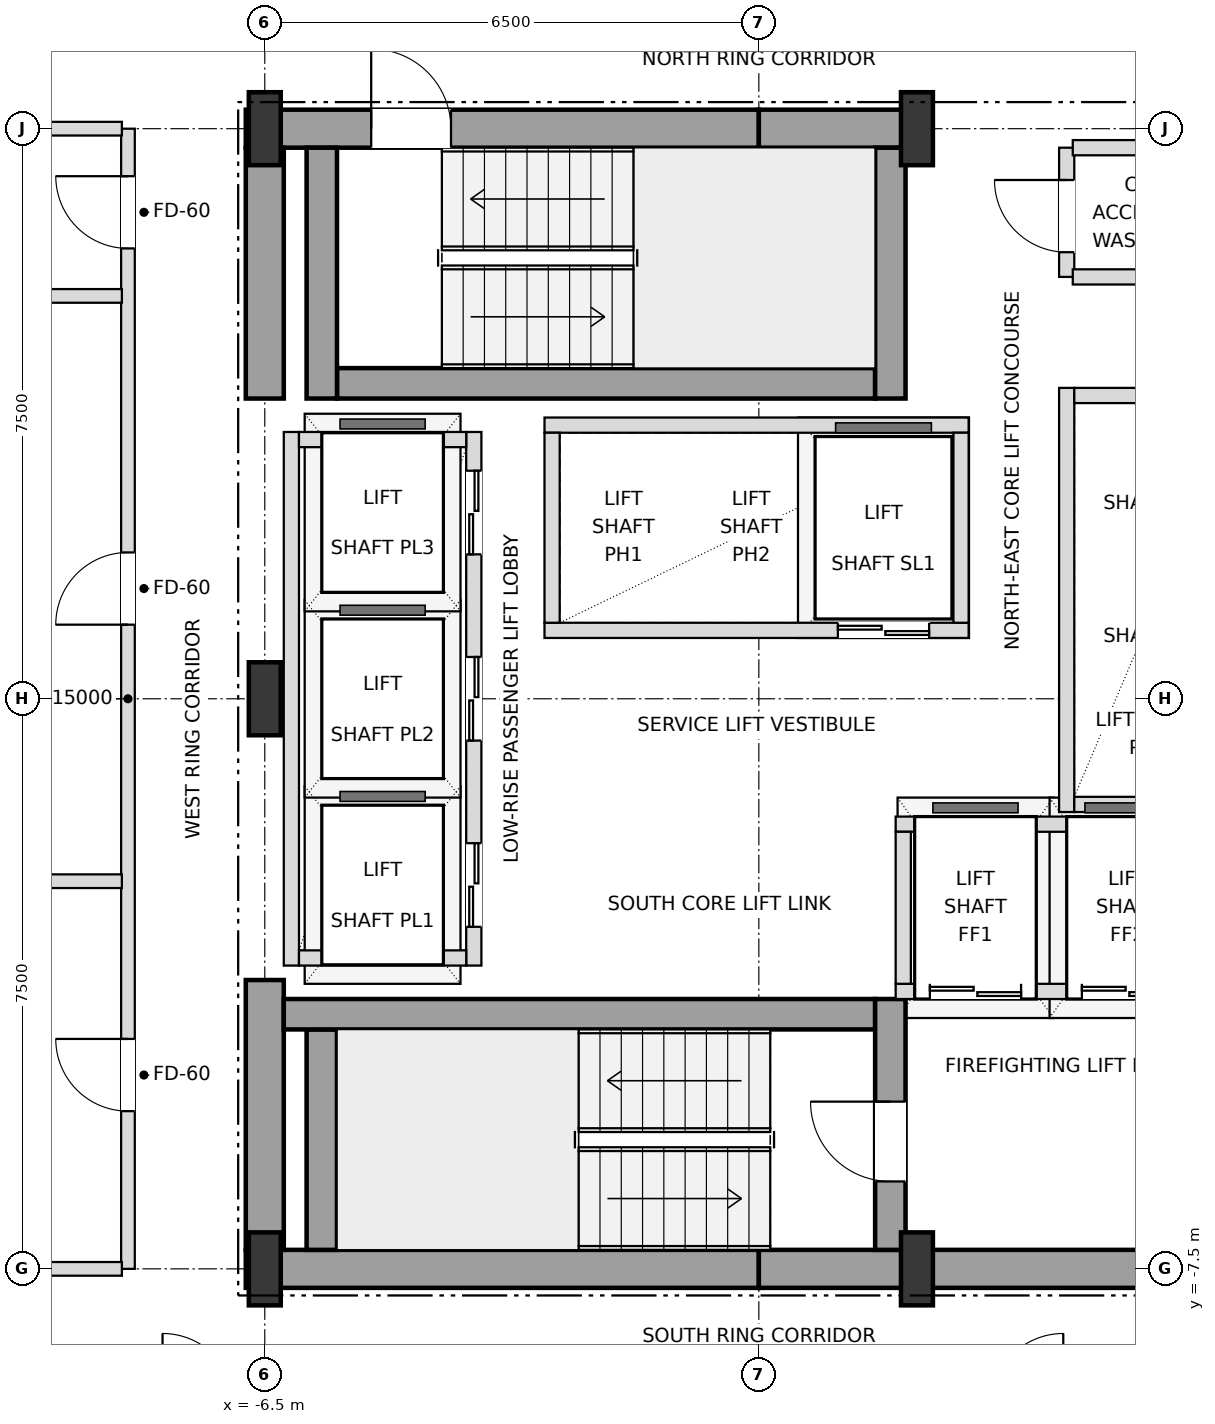
"""IFC4 building model, lengths in metres.
Left out: names, types, materials, properties, quantities, classifications, styles, units other than length and angle.
Written with IfcOpenShell. Run it as: python <this file> out.ifc"""

import sys

from ifc_helpers import new_model, si_unit, direction, frame, frame_2d, origin, origin_2d, place, context, subcontext, project, spatial, rectangle, i_section, extrude, element, fill, save


model = new_model("IFC4")
c1 = context("Model", 3, precision=1e-05, world=origin(), true_north=direction((0.0, 1.0)))
c2 = subcontext(c1, "Body", "Model", "MODEL_VIEW")
j1 = project(units=[si_unit("LENGTHUNIT", "METRE"), si_unit("PLANEANGLEUNIT", "RADIAN")], contexts=[c1])
p1 = place(None, origin())
s1 = spatial("IfcSite", under=j1, at=p1, CompositionType="ELEMENT")
p2 = place(p1, origin())
s2 = spatial("IfcBuilding", under=s1, at=p2, CompositionType="ELEMENT")
p3 = place(p2, frame((0.0, 0.0, 86.4)))
s3 = spatial("IfcBuildingStorey", under=s2, at=p3, CompositionType="ELEMENT", Elevation=86.4)
for number, where, z_axis, x_axis in (
    (1, (-6.5, -7.5, 0.0), (0.0, 0.0, 1.0), (1.0, 0.0, 0.0)),
    (2, (2.08, -7.5, 0.0), (0.0, 0.0, 1.0), (1.0, 0.0, 0.0)),
    (3, (-6.5, 0.0, 0.0), (0.0, 0.0, 1.0), (1.0, 0.0, 0.0)),
    (4, (-6.5, 7.5, 0.0), (0.0, 0.0, 1.0), (1.0, 0.0, 0.0)),
    (5, (2.08, 7.5, 0.0), (0.0, 0.0, 1.0), (1.0, 0.0, 0.0)),
):
    element("IfcColumn", number, at=place(p3, frame(where, z_axis=z_axis, x_axis=x_axis)), inside=s3, PredefinedType="COLUMN", context=c2, shape_type="SweptSolid", body=[
        extrude(i_section(OverallWidth=0.42, OverallDepth=0.96, WebThickness=0.022, FlangeThickness=0.034, at=origin_2d()), origin(), (0.0, 0.0, 1.0), 3.6),
    ])
for number, where, z_axis, x_axis in (
    (6, (-6.75, -7.5, 0.0), (0.0, 0.0, 1.0), (1.0, 0.0, 0.0)),
    (7, (0.0, -7.5, 0.0), (0.0, 0.0, 1.0), (1.0, 0.0, 0.0)),
):
    element("IfcWall", number, at=place(p3, frame(where, z_axis=z_axis, x_axis=x_axis)), inside=s3, PredefinedType="SHEAR", context=c2, shape_type="SweptSolid", body=[
        extrude(rectangle(XDim=6.75, YDim=0.5, at=frame_2d((3.375, 0.0))), origin(), (0.0, 0.0, 1.0), 3.38),
    ])
p4 = place(p3, frame((-6.75, 7.5, 0.0), z_axis=(0.0, 0.0, 1.0), x_axis=(1.0, 0.0, 0.0)))
e8 = element("IfcWall", 8, at=p4, inside=s3, PredefinedType="SHEAR", context=c2, shape_type="SweptSolid", body=[
    extrude(rectangle(XDim=6.75, YDim=0.5, at=frame_2d((3.375, 0.0))), origin(), (0.0, 0.0, 1.0), 3.38),
])
p5 = place(p4, frame((1.65, 0.0, 0.0)))
e9 = element("IfcOpeningElement", 9, at=p5, cuts=e8, PredefinedType="OPENING", context=c2, shape_type="SweptSolid", body=[
    extrude(rectangle(XDim=1.05, YDim=2.15, at=frame_2d((0.525, 1.075))), frame((0.0, 0.26, 0.0), z_axis=(0.0, -1.0, 0.0), x_axis=(1.0, 0.0, 0.0)), (0.0, 0.0, 1.0), 0.52),
])
p6 = place(p3, frame((0.0, 7.5, 0.0), z_axis=(0.0, 0.0, 1.0), x_axis=(1.0, 0.0, 0.0)))
e10 = element("IfcWall", 10, at=p6, inside=s3, PredefinedType="SHEAR", context=c2, shape_type="SweptSolid", body=[
    extrude(rectangle(XDim=2.08, YDim=0.5, at=frame_2d((1.04, 0.0))), origin(), (0.0, 0.0, 1.0), 3.38),
])
p7 = place(p3, frame((-6.5, -7.25, 0.0), z_axis=(0.0, 0.0, 1.0), x_axis=(0.0, 1.0, 0.0)))
e11 = element("IfcWall", 11, at=p7, inside=s3, PredefinedType="SHEAR", context=c2, shape_type="SweptSolid", body=[
    extrude(rectangle(XDim=3.55, YDim=0.5, at=frame_2d((1.775, 0.0))), origin(), (0.0, 0.0, 1.0), 3.38),
])
p8 = place(p3, frame((-6.5, 3.95, 0.0), z_axis=(0.0, 0.0, 1.0), x_axis=(0.0, 1.0, 0.0)))
e12 = element("IfcWall", 12, at=p8, inside=s3, PredefinedType="SHEAR", context=c2, shape_type="SweptSolid", body=[
    extrude(rectangle(XDim=3.3, YDim=0.5, at=frame_2d((1.65, 0.0))), origin(), (0.0, 0.0, 1.0), 3.38),
])
p9 = place(p3, frame((-5.75, -7.25, 0.0), z_axis=(0.0, 0.0, 1.0), x_axis=(0.0, 1.0, 0.0)))
e13 = element("IfcWall", 13, at=p9, inside=s3, PredefinedType="SHEAR", context=c2, shape_type="SweptSolid", body=[
    extrude(rectangle(XDim=2.9, YDim=0.4, at=frame_2d((1.45, 0.0))), origin(), (0.0, 0.0, 1.0), 3.38),
])
p10 = place(p3, frame((-6.25, -4.15, 0.0), z_axis=(0.0, 0.0, 1.0), x_axis=(1.0, 0.0, 0.0)))
e14 = element("IfcWall", 14, at=p10, inside=s3, PredefinedType="SHEAR", context=c2, shape_type="SweptSolid", body=[
    extrude(rectangle(XDim=7.78, YDim=0.4, at=frame_2d((3.89, 0.0))), origin(), (0.0, 0.0, 1.0), 3.38),
])
p11 = place(p3, frame((1.73, -7.25, 0.0), z_axis=(0.0, 0.0, 1.0), x_axis=(0.0, 1.0, 0.0)))
e15 = element("IfcWall", 15, at=p11, inside=s3, PredefinedType="SHEAR", context=c2, shape_type="SweptSolid", body=[
    extrude(rectangle(XDim=3.3, YDim=0.4, at=frame_2d((1.65, 0.0))), origin(), (0.0, 0.0, 1.0), 3.38),
])
p12 = place(p11, frame((0.9, 0.0, 0.0)))
e16 = element("IfcOpeningElement", 16, at=p12, cuts=e15, PredefinedType="OPENING", context=c2, shape_type="SweptSolid", body=[
    extrude(rectangle(XDim=1.05, YDim=2.15, at=frame_2d((0.525, 1.075))), frame((0.0, 0.21, 0.0), z_axis=(0.0, -1.0, 0.0), x_axis=(1.0, 0.0, 0.0)), (0.0, 0.0, 1.0), 0.42),
])
p13 = place(p3, frame((-5.55, 4.15, 0.0), z_axis=(0.0, 0.0, 1.0), x_axis=(1.0, 0.0, 0.0)))
e17 = element("IfcWall", 17, at=p13, inside=s3, PredefinedType="SHEAR", context=c2, shape_type="SweptSolid", body=[
    extrude(rectangle(XDim=7.08, YDim=0.4, at=frame_2d((3.54, 0.0))), origin(), (0.0, 0.0, 1.0), 3.38),
])
for number, where, z_axis, x_axis in (
    (18, (1.73, 3.95, 0.0), (0.0, 0.0, 1.0), (0.0, 1.0, 0.0)),
    (19, (-5.75, 3.95, 0.0), (0.0, 0.0, 1.0), (0.0, 1.0, 0.0)),
):
    element("IfcWall", number, at=place(p3, frame(where, z_axis=z_axis, x_axis=x_axis)), inside=s3, PredefinedType="SHEAR", context=c2, shape_type="SweptSolid", body=[
        extrude(rectangle(XDim=3.3, YDim=0.4, at=frame_2d((1.65, 0.0))), origin(), (0.0, 0.0, 1.0), 3.38),
    ])
p14 = place(p3, frame((-3.75, -3.51, 0.0), z_axis=(0.0, 0.0, 1.0), x_axis=(0.0, 1.0, 0.0)))
e20 = element("IfcWall", 20, at=p14, inside=s3, PredefinedType="SOLIDWALL", context=c2, shape_type="SweptSolid", body=[
    extrude(rectangle(XDim=7.02, YDim=0.2, at=frame_2d((3.51, 0.0))), origin(), (0.0, 0.0, 1.0), 3.38),
])
p15 = place(p14, frame((0.51, 0.0, 0.0)))
e21 = element("IfcOpeningElement", 21, at=p15, cuts=e20, PredefinedType="OPENING", context=c2, shape_type="SweptSolid", body=[
    extrude(rectangle(XDim=1.1, YDim=2.15, at=frame_2d((0.55, 1.075))), frame((0.0, 0.11, 0.0), z_axis=(0.0, -1.0, 0.0), x_axis=(1.0, 0.0, 0.0)), (0.0, 0.0, 1.0), 0.22),
])
p16 = place(p14, frame((2.96, 0.0, 0.0)))
e22 = element("IfcOpeningElement", 22, at=p16, cuts=e20, PredefinedType="OPENING", context=c2, shape_type="SweptSolid", body=[
    extrude(rectangle(XDim=1.1, YDim=2.15, at=frame_2d((0.55, 1.075))), frame((0.0, 0.11, 0.0), z_axis=(0.0, -1.0, 0.0), x_axis=(1.0, 0.0, 0.0)), (0.0, 0.0, 1.0), 0.22),
])
p17 = place(p14, frame((5.41, 0.0, 0.0)))
e23 = element("IfcOpeningElement", 23, at=p17, cuts=e20, PredefinedType="OPENING", context=c2, shape_type="SweptSolid", body=[
    extrude(rectangle(XDim=1.1, YDim=2.15, at=frame_2d((0.55, 1.075))), frame((0.0, 0.11, 0.0), z_axis=(0.0, -1.0, 0.0), x_axis=(1.0, 0.0, 0.0)), (0.0, 0.0, 1.0), 0.22),
])
p18 = place(p3, frame((-6.15, -3.51, 0.0), z_axis=(0.0, 0.0, 1.0), x_axis=(0.0, 1.0, 0.0)))
e24 = element("IfcWall", 24, at=p18, inside=s3, PredefinedType="SOLIDWALL", context=c2, shape_type="SweptSolid", body=[
    extrude(rectangle(XDim=7.02, YDim=0.2, at=frame_2d((3.51, 0.0))), origin(), (0.0, 0.0, 1.0), 3.38),
])
for number, where, z_axis, x_axis in (
    (25, (-6.05, -3.41, 0.0), (0.0, 0.0, 1.0), (1.0, 0.0, 0.0)),
    (26, (-6.05, 3.41, 0.0), (0.0, 0.0, 1.0), (1.0, 0.0, 0.0)),
):
    element("IfcWall", number, at=place(p3, frame(where, z_axis=z_axis, x_axis=x_axis)), inside=s3, PredefinedType="SOLIDWALL", context=c2, shape_type="SweptSolid", body=[
        extrude(rectangle(XDim=2.2, YDim=0.2, at=frame_2d((1.1, 0.0))), origin(), (0.0, 0.0, 1.0), 3.38),
    ])
p19 = place(p3, frame((4.05, -1.49, 0.0), z_axis=(0.0, 0.0, 1.0), x_axis=(0.0, 1.0, 0.0)))
e27 = element("IfcWall", 27, at=p19, inside=s3, PredefinedType="SOLIDWALL", context=c2, shape_type="SweptSolid", body=[
    extrude(rectangle(XDim=5.58, YDim=0.2, at=frame_2d((2.79, 0.0))), origin(), (0.0, 0.0, 1.0), 3.38),
])
for number, where, z_axis, x_axis in (
    (28, (4.15, -1.39, 0.0), (0.0, 0.0, 1.0), (1.0, 0.0, 0.0)),
    (29, (4.15, 3.99, 0.0), (0.0, 0.0, 1.0), (1.0, 0.0, 0.0)),
):
    element("IfcWall", number, at=place(p3, frame(where, z_axis=z_axis, x_axis=x_axis)), inside=s3, PredefinedType="SOLIDWALL", context=c2, shape_type="SweptSolid", body=[
        extrude(rectangle(XDim=2.2, YDim=0.2, at=frame_2d((1.1, 0.0))), origin(), (0.0, 0.0, 1.0), 3.38),
    ])
p20 = place(p3, frame((-2.82, 0.9, 0.0), z_axis=(0.0, 0.0, 1.0), x_axis=(1.0, 0.0, 0.0)))
e30 = element("IfcWall", 30, at=p20, inside=s3, PredefinedType="SOLIDWALL", context=c2, shape_type="SweptSolid", body=[
    extrude(rectangle(XDim=5.58, YDim=0.2, at=frame_2d((2.79, 0.0))), origin(), (0.0, 0.0, 1.0), 3.38),
])
p21 = place(p20, frame((3.86, 0.0, 0.0)))
e31 = element("IfcOpeningElement", 31, at=p21, cuts=e30, PredefinedType="OPENING", context=c2, shape_type="SweptSolid", body=[
    extrude(rectangle(XDim=1.2, YDim=2.2, at=frame_2d((0.6, 1.1))), frame((0.0, 0.11, 0.0), z_axis=(0.0, -1.0, 0.0), x_axis=(1.0, 0.0, 0.0)), (0.0, 0.0, 1.0), 0.22),
])
p22 = place(p3, frame((-2.82, 3.6, 0.0), z_axis=(0.0, 0.0, 1.0), x_axis=(1.0, 0.0, 0.0)))
e32 = element("IfcWall", 32, at=p22, inside=s3, PredefinedType="SOLIDWALL", context=c2, shape_type="SweptSolid", body=[
    extrude(rectangle(XDim=5.58, YDim=0.2, at=frame_2d((2.79, 0.0))), origin(), (0.0, 0.0, 1.0), 3.38),
])
for number, where, z_axis, x_axis in (
    (33, (-2.72, 1.0, 0.0), (0.0, 0.0, 1.0), (0.0, 1.0, 0.0)),
    (34, (2.66, 1.0, 0.0), (0.0, 0.0, 1.0), (0.0, 1.0, 0.0)),
):
    element("IfcWall", number, at=place(p3, frame(where, z_axis=z_axis, x_axis=x_axis)), inside=s3, PredefinedType="SOLIDWALL", context=c2, shape_type="SweptSolid", body=[
        extrude(rectangle(XDim=2.5, YDim=0.2, at=frame_2d((1.25, 0.0))), origin(), (0.0, 0.0, 1.0), 3.38),
    ])
p23 = place(p3, frame((1.8, -3.85, 0.0), z_axis=(0.0, 0.0, 1.0), x_axis=(1.0, 0.0, 0.0)))
e35 = element("IfcWall", 35, at=p23, inside=s3, PredefinedType="SOLIDWALL", context=c2, shape_type="SweptSolid", body=[
    extrude(rectangle(XDim=4.1, YDim=0.2, at=frame_2d((2.05, 0.0))), origin(), (0.0, 0.0, 1.0), 3.38),
])
p24 = place(p23, frame((0.45, 0.0, 0.0)))
e36 = element("IfcOpeningElement", 36, at=p24, cuts=e35, PredefinedType="OPENING", context=c2, shape_type="SweptSolid", body=[
    extrude(rectangle(XDim=1.2, YDim=2.2, at=frame_2d((0.6, 1.1))), frame((0.0, 0.11, 0.0), z_axis=(0.0, -1.0, 0.0), x_axis=(1.0, 0.0, 0.0)), (0.0, 0.0, 1.0), 0.22),
])
p25 = place(p23, frame((2.45, 0.0, 0.0)))
e37 = element("IfcOpeningElement", 37, at=p25, cuts=e35, PredefinedType="OPENING", context=c2, shape_type="SweptSolid", body=[
    extrude(rectangle(XDim=1.2, YDim=2.2, at=frame_2d((0.6, 1.1))), frame((0.0, 0.11, 0.0), z_axis=(0.0, -1.0, 0.0), x_axis=(1.0, 0.0, 0.0)), (0.0, 0.0, 1.0), 0.22),
])
p26 = place(p3, frame((1.8, -1.65, 0.0), z_axis=(0.0, 0.0, 1.0), x_axis=(1.0, 0.0, 0.0)))
e38 = element("IfcWall", 38, at=p26, inside=s3, PredefinedType="SOLIDWALL", context=c2, shape_type="SweptSolid", body=[
    extrude(rectangle(XDim=4.1, YDim=0.2, at=frame_2d((2.05, 0.0))), origin(), (0.0, 0.0, 1.0), 3.38),
])
p27 = place(p3, frame((1.9, -3.75, 0.0), z_axis=(0.0, 0.0, 1.0), x_axis=(0.0, 1.0, 0.0)))
e39 = element("IfcWall", 39, at=p27, inside=s3, PredefinedType="SOLIDWALL", context=c2, shape_type="SweptSolid", body=[
    extrude(rectangle(XDim=2.0, YDim=0.2, at=frame_2d((1.0, 0.0))), origin(), (0.0, 0.0, 1.0), 3.38),
])
p28 = place(p3, frame((-8.3, -7.5, 0.0), z_axis=(0.0, 0.0, 1.0), x_axis=(0.0, 1.0, 0.0)))
e40 = element("IfcWall", 40, at=p28, inside=s3, PredefinedType="PARTITIONING", context=c2, shape_type="SweptSolid", body=[
    extrude(rectangle(XDim=15.0, YDim=0.18, at=frame_2d((7.5, 0.0))), origin(), (0.0, 0.0, 1.0), 3.38),
])
p29 = place(p28, frame((2.075, 0.0, 0.0)))
e41 = element("IfcOpeningElement", 41, at=p29, cuts=e40, PredefinedType="OPENING", context=c2, shape_type="SweptSolid", body=[
    extrude(rectangle(XDim=0.95, YDim=2.15, at=frame_2d((0.475, 1.075))), frame((0.0, 0.1, 0.0), z_axis=(0.0, -1.0, 0.0), x_axis=(1.0, 0.0, 0.0)), (0.0, 0.0, 1.0), 0.2),
])
p30 = place(p28, frame((8.475, 0.0, 0.0)))
e42 = element("IfcOpeningElement", 42, at=p30, cuts=e40, PredefinedType="OPENING", context=c2, shape_type="SweptSolid", body=[
    extrude(rectangle(XDim=0.95, YDim=2.15, at=frame_2d((0.475, 1.075))), frame((0.0, 0.1, 0.0), z_axis=(0.0, -1.0, 0.0), x_axis=(1.0, 0.0, 0.0)), (0.0, 0.0, 1.0), 0.2),
])
p31 = place(p28, frame((13.425, 0.0, 0.0)))
e43 = element("IfcOpeningElement", 43, at=p31, cuts=e40, PredefinedType="OPENING", context=c2, shape_type="SweptSolid", body=[
    extrude(rectangle(XDim=0.95, YDim=2.15, at=frame_2d((0.475, 1.075))), frame((0.0, 0.1, 0.0), z_axis=(0.0, -1.0, 0.0), x_axis=(1.0, 0.0, 0.0)), (0.0, 0.0, 1.0), 0.2),
])
p32 = place(p3, frame((4.05, 5.55, 0.0), z_axis=(0.0, 0.0, 1.0), x_axis=(0.0, 1.0, 0.0)))
e44 = element("IfcWall", 44, at=p32, inside=s3, PredefinedType="SOLIDWALL", context=c2, shape_type="SweptSolid", body=[
    extrude(rectangle(XDim=1.7, YDim=0.2, at=frame_2d((0.85, 0.0))), origin(), (0.0, 0.0, 1.0), 3.38),
])
p33 = place(p32, frame((0.325, 0.0, 0.0)))
e45 = element("IfcOpeningElement", 45, at=p33, cuts=e44, PredefinedType="OPENING", context=c2, shape_type="SweptSolid", body=[
    extrude(rectangle(XDim=0.95, YDim=2.15, at=frame_2d((0.475, 1.075))), frame((0.0, 0.11, 0.0), z_axis=(0.0, -1.0, 0.0), x_axis=(1.0, 0.0, 0.0)), (0.0, 0.0, 1.0), 0.22),
])
p34 = place(p3, frame((-21.9, -7.5, 0.0), z_axis=(0.0, 0.0, 1.0), x_axis=(1.0, 0.0, 0.0)))
e46 = element("IfcWall", 46, at=p34, inside=s3, PredefinedType="PARTITIONING", context=c2, shape_type="SweptSolid", body=[
    extrude(rectangle(XDim=13.52, YDim=0.18, at=frame_2d((6.76, 0.0))), origin(), (0.0, 0.0, 1.0), 2.816),
])
for number, where, z_axis, x_axis in (
    (47, (-21.82, -2.4, 0.0), (0.0, 0.0, 1.0), (1.0, 0.0, 0.0)),
    (48, (-21.82, 5.3, 0.0), (0.0, 0.0, 1.0), (1.0, 0.0, 0.0)),
):
    element("IfcWall", number, at=place(p3, frame(where, z_axis=z_axis, x_axis=x_axis)), inside=s3, PredefinedType="PARTITIONING", context=c2, shape_type="SweptSolid", body=[
        extrude(rectangle(XDim=13.44, YDim=0.18, at=frame_2d((6.72, 0.0))), origin(), (0.0, 0.0, 1.0), 2.816),
    ])
for number, where, z_axis, x_axis in (
    (49, (4.13, 5.55, 0.0), (0.0, 0.0, 1.0), (1.0, 0.0, 0.0)),
    (50, (4.13, 7.25, 0.0), (0.0, 0.0, 1.0), (1.0, 0.0, 0.0)),
):
    element("IfcWall", number, at=place(p3, frame(where, z_axis=z_axis, x_axis=x_axis)), inside=s3, PredefinedType="SOLIDWALL", context=c2, shape_type="SweptSolid", body=[
        extrude(rectangle(XDim=2.07, YDim=0.2, at=frame_2d((1.035, 0.0))), origin(), (0.0, 0.0, 1.0), 3.38),
    ])
p35 = place(p3, frame((-21.9, 7.5, 0.0), z_axis=(0.0, 0.0, 1.0), x_axis=(1.0, 0.0, 0.0)))
e51 = element("IfcWall", 51, at=p35, inside=s3, PredefinedType="PARTITIONING", context=c2, shape_type="SweptSolid", body=[
    extrude(rectangle(XDim=13.52, YDim=0.18, at=frame_2d((6.76, 0.0))), origin(), (0.0, 0.0, 1.0), 2.816),
])
p36 = place(p12, origin())
e52 = element("IfcDoor", 52, at=p36, inside=s3, OperationType="SINGLE_SWING_RIGHT", PredefinedType="DOOR", context=c2, shape_type="SweptSolid", body=[
    extrude(rectangle(XDim=1.05, YDim=2.15, at=frame_2d((0.525, 1.075))), frame((0.0, 0.025, 0.0), z_axis=(0.0, -1.0, 0.0), x_axis=(1.0, 0.0, 0.0)), (0.0, 0.0, 1.0), 0.05),
])
fill(e16, e52)
p37 = place(p5, origin())
e53 = element("IfcDoor", 53, at=p37, inside=s3, OperationType="SINGLE_SWING_LEFT", PredefinedType="DOOR", context=c2, shape_type="SweptSolid", body=[
    extrude(rectangle(XDim=1.05, YDim=2.15, at=frame_2d((0.525, 1.075))), frame((0.0, 0.025, 0.0), z_axis=(0.0, -1.0, 0.0), x_axis=(1.0, 0.0, 0.0)), (0.0, 0.0, 1.0), 0.05),
])
fill(e9, e53)
p38 = place(p15, origin())
e54 = element("IfcDoor", 54, at=p38, inside=s3, OperationType="DOUBLE_DOOR_SLIDING", PredefinedType="DOOR", context=c2, shape_type="SweptSolid", body=[
    extrude(rectangle(XDim=1.1, YDim=2.15, at=frame_2d((0.55, 1.075))), frame((0.0, 0.025, 0.0), z_axis=(0.0, -1.0, 0.0), x_axis=(1.0, 0.0, 0.0)), (0.0, 0.0, 1.0), 0.05),
])
fill(e21, e54)
p39 = place(p16, origin())
e55 = element("IfcDoor", 55, at=p39, inside=s3, OperationType="DOUBLE_DOOR_SLIDING", PredefinedType="DOOR", context=c2, shape_type="SweptSolid", body=[
    extrude(rectangle(XDim=1.1, YDim=2.15, at=frame_2d((0.55, 1.075))), frame((0.0, 0.025, 0.0), z_axis=(0.0, -1.0, 0.0), x_axis=(1.0, 0.0, 0.0)), (0.0, 0.0, 1.0), 0.05),
])
fill(e22, e55)
p40 = place(p17, origin())
e56 = element("IfcDoor", 56, at=p40, inside=s3, OperationType="DOUBLE_DOOR_SLIDING", PredefinedType="DOOR", context=c2, shape_type="SweptSolid", body=[
    extrude(rectangle(XDim=1.1, YDim=2.15, at=frame_2d((0.55, 1.075))), frame((0.0, 0.025, 0.0), z_axis=(0.0, -1.0, 0.0), x_axis=(1.0, 0.0, 0.0)), (0.0, 0.0, 1.0), 0.05),
])
fill(e23, e56)
p41 = place(p21, origin())
e57 = element("IfcDoor", 57, at=p41, inside=s3, OperationType="DOUBLE_DOOR_SLIDING", PredefinedType="DOOR", context=c2, shape_type="SweptSolid", body=[
    extrude(rectangle(XDim=1.2, YDim=2.2, at=frame_2d((0.6, 1.1))), frame((0.0, 0.025, 0.0), z_axis=(0.0, -1.0, 0.0), x_axis=(1.0, 0.0, 0.0)), (0.0, 0.0, 1.0), 0.05),
])
fill(e31, e57)
p42 = place(p24, origin())
e58 = element("IfcDoor", 58, at=p42, inside=s3, OperationType="DOUBLE_DOOR_SLIDING", PredefinedType="DOOR", context=c2, shape_type="SweptSolid", body=[
    extrude(rectangle(XDim=1.2, YDim=2.2, at=frame_2d((0.6, 1.1))), frame((0.0, 0.025, 0.0), z_axis=(0.0, -1.0, 0.0), x_axis=(1.0, 0.0, 0.0)), (0.0, 0.0, 1.0), 0.05),
])
fill(e36, e58)
p43 = place(p25, origin())
e59 = element("IfcDoor", 59, at=p43, inside=s3, OperationType="DOUBLE_DOOR_SLIDING", PredefinedType="DOOR", context=c2, shape_type="SweptSolid", body=[
    extrude(rectangle(XDim=1.2, YDim=2.2, at=frame_2d((0.6, 1.1))), frame((0.0, 0.025, 0.0), z_axis=(0.0, -1.0, 0.0), x_axis=(1.0, 0.0, 0.0)), (0.0, 0.0, 1.0), 0.05),
])
fill(e37, e59)
p44 = place(p33, origin())
e60 = element("IfcDoor", 60, at=p44, inside=s3, OperationType="SINGLE_SWING_RIGHT", PredefinedType="DOOR", context=c2, shape_type="SweptSolid", body=[
    extrude(rectangle(XDim=0.95, YDim=2.15, at=frame_2d((0.475, 1.075))), frame((0.0, 0.025, 0.0), z_axis=(0.0, -1.0, 0.0), x_axis=(1.0, 0.0, 0.0)), (0.0, 0.0, 1.0), 0.05),
])
fill(e45, e60)
p45 = place(p29, origin())
e61 = element("IfcDoor", 61, at=p45, inside=s3, OperationType="SINGLE_SWING_RIGHT", PredefinedType="DOOR", context=c2, shape_type="SweptSolid", body=[
    extrude(rectangle(XDim=0.95, YDim=2.15, at=frame_2d((0.475, 1.075))), frame((0.0, 0.025, 0.0), z_axis=(0.0, -1.0, 0.0), x_axis=(1.0, 0.0, 0.0)), (0.0, 0.0, 1.0), 0.05),
])
fill(e41, e61)
p46 = place(p30, origin())
e62 = element("IfcDoor", 62, at=p46, inside=s3, OperationType="SINGLE_SWING_LEFT", PredefinedType="DOOR", context=c2, shape_type="SweptSolid", body=[
    extrude(rectangle(XDim=0.95, YDim=2.15, at=frame_2d((0.475, 1.075))), frame((0.0, 0.025, 0.0), z_axis=(0.0, -1.0, 0.0), x_axis=(1.0, 0.0, 0.0)), (0.0, 0.0, 1.0), 0.05),
])
fill(e42, e62)
p47 = place(p31, origin())
e63 = element("IfcDoor", 63, at=p47, inside=s3, OperationType="SINGLE_SWING_RIGHT", PredefinedType="DOOR", context=c2, shape_type="SweptSolid", body=[
    extrude(rectangle(XDim=0.95, YDim=2.15, at=frame_2d((0.475, 1.075))), frame((0.0, 0.025, 0.0), z_axis=(0.0, -1.0, 0.0), x_axis=(1.0, 0.0, 0.0)), (0.0, 0.0, 1.0), 0.05),
])
fill(e43, e63)
save(model, sys.argv[1])
